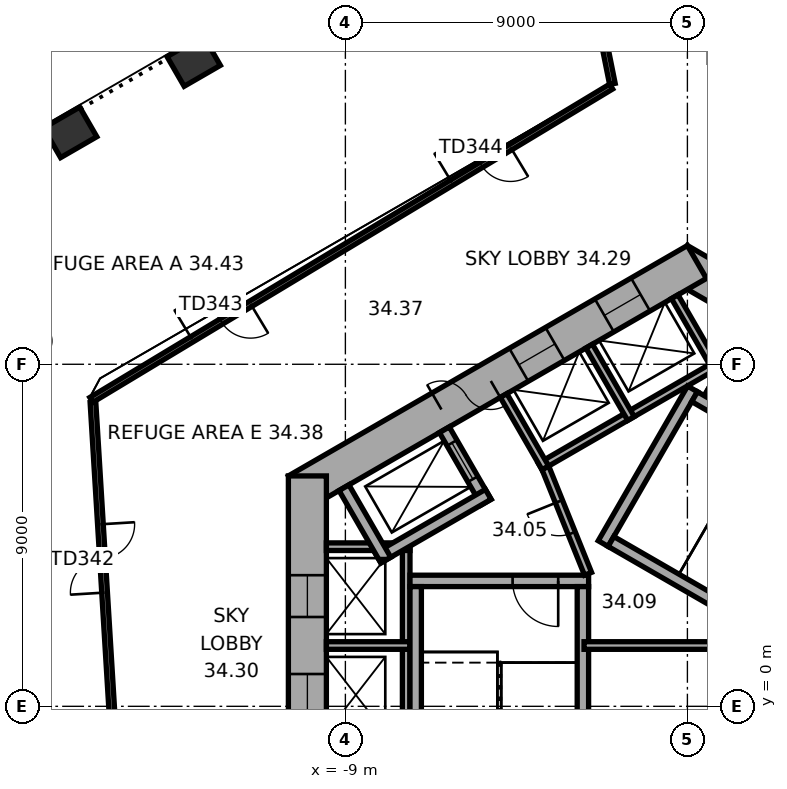
"""IFC4 building model, lengths in metres.
Left out: names, types, materials, properties, quantities, classifications, styles, units other than length and angle.
Written with IfcOpenShell. Run it as: python <this file> out.ifc"""

import sys

from ifc_helpers import new_model, si_unit, direction, frame, frame_2d, origin, origin_2d, place, context, subcontext, project, spatial, rectangle, extrude, element, fill, save


model = new_model("IFC4")
c1 = context("Model", 3, precision=1e-05, world=origin(), true_north=direction((0.0, 1.0)))
c2 = subcontext(c1, "Body", "Model", "MODEL_VIEW")
j1 = project(units=[si_unit("LENGTHUNIT", "METRE"), si_unit("PLANEANGLEUNIT", "RADIAN")], contexts=[c1])
p1 = place(None, origin())
s1 = spatial("IfcSite", under=j1, at=p1, CompositionType="ELEMENT")
p2 = place(p1, origin())
s2 = spatial("IfcBuilding", under=s1, at=p2, CompositionType="ELEMENT")
p3 = place(p2, frame((0.0, 0.0, 139.2)))
s3 = spatial("IfcBuildingStorey", under=s2, at=p3, CompositionType="ELEMENT", Elevation=139.2)
for number, where, z_axis, x_axis in (
    (1, (-12.991, 16.979, 0.0), (0.0, 0.0, 1.0), (-0.866, -0.5, 0.0)),
    (2, (-16.242, 15.102, 0.0), (0.0, 0.0, 1.0), (-0.866, -0.5, 0.0)),
):
    element("IfcColumn", number, at=place(p3, frame(where, z_axis=z_axis, x_axis=x_axis)), inside=s3, PredefinedType="COLUMN", context=c2, shape_type="SweptSolid", body=[
        extrude(rectangle(XDim=1.1, YDim=0.9, at=origin_2d()), origin(), (0.0, 0.0, 1.0), 7.4),
    ])
p4 = place(p3, frame((10.25, 5.629, 0.0), z_axis=(0.0, 0.0, 1.0), x_axis=(-0.866022616891, 0.50000482701, 0.0)))
e3 = element("IfcWall", 3, at=p4, inside=s3, PredefinedType="SHEAR", context=c2, shape_type="SweptSolid", body=[
    extrude(rectangle(XDim=12.125, YDim=1.0, at=frame_2d((6.062, 0.0))), origin(), (0.0, 0.0, 1.0), 7.4),
])
p5 = place(p4, frame((2.612, 0.0, 0.0)))
e4 = element("IfcOpeningElement", 4, at=p5, cuts=e3, PredefinedType="OPENING", context=c2, shape_type="SweptSolid", body=[
    extrude(rectangle(XDim=1.1, YDim=2.1, at=frame_2d((0.55, 1.05))), frame((0.0, 0.51, 0.0), z_axis=(0.0, -1.0, 0.0), x_axis=(1.0, 0.0, 0.0)), (0.0, 0.0, 1.0), 1.02),
])
p6 = place(p4, frame((5.212, 0.0, 0.0)))
e5 = element("IfcOpeningElement", 5, at=p6, cuts=e3, PredefinedType="OPENING", context=c2, shape_type="SweptSolid", body=[
    extrude(rectangle(XDim=1.1, YDim=2.1, at=frame_2d((0.55, 1.05))), frame((0.0, 0.51, 0.0), z_axis=(0.0, -1.0, 0.0), x_axis=(1.0, 0.0, 0.0)), (0.0, 0.0, 1.0), 1.02),
])
p7 = place(p4, frame((7.812, 0.0, 0.0)))
e6 = element("IfcOpeningElement", 6, at=p7, cuts=e3, PredefinedType="OPENING", context=c2, shape_type="SweptSolid", body=[
    extrude(rectangle(XDim=1.1, YDim=2.1, at=frame_2d((0.55, 1.05))), frame((0.0, 0.51, 0.0), z_axis=(0.0, -1.0, 0.0), x_axis=(1.0, 0.0, 0.0)), (0.0, 0.0, 1.0), 1.02),
])
p8 = place(p3, frame((0.25, 11.691, 0.0), z_axis=(0.0, 0.0, 1.0), x_axis=(-0.866022616891, -0.50000482701, 0.0)))
e7 = element("IfcWall", 7, at=p8, inside=s3, PredefinedType="SHEAR", context=c2, shape_type="SweptSolid", body=[
    extrude(rectangle(XDim=12.125, YDim=1.0, at=frame_2d((6.062, 0.0))), origin(), (0.0, 0.0, 1.0), 7.4),
])
p9 = place(p8, frame((6.262, 0.0, 0.0)))
e8 = element("IfcOpeningElement", 8, at=p9, cuts=e7, PredefinedType="OPENING", context=c2, shape_type="SweptSolid", body=[
    extrude(rectangle(XDim=1.5, YDim=2.1, at=frame_2d((0.75, 1.05))), frame((0.0, 0.51, 0.0), z_axis=(0.0, -1.0, 0.0), x_axis=(1.0, 0.0, 0.0)), (0.0, 0.0, 1.0), 1.02),
])
p10 = place(p8, frame((1.712, 0.0, 0.0)))
e9 = element("IfcOpeningElement", 9, at=p10, cuts=e7, PredefinedType="OPENING", context=c2, shape_type="SweptSolid", body=[
    extrude(rectangle(XDim=1.1, YDim=2.1, at=frame_2d((0.55, 1.05))), frame((0.0, 0.51, 0.0), z_axis=(0.0, -1.0, 0.0), x_axis=(1.0, 0.0, 0.0)), (0.0, 0.0, 1.0), 1.02),
])
p11 = place(p8, frame((4.312, 0.0, 0.0)))
e10 = element("IfcOpeningElement", 10, at=p11, cuts=e7, PredefinedType="OPENING", context=c2, shape_type="SweptSolid", body=[
    extrude(rectangle(XDim=1.1, YDim=2.1, at=frame_2d((0.55, 1.05))), frame((0.0, 0.51, 0.0), z_axis=(0.0, -1.0, 0.0), x_axis=(1.0, 0.0, 0.0)), (0.0, 0.0, 1.0), 1.02),
])
p12 = place(p3, frame((-10.0, 6.062, 0.0), z_axis=(0.0, 0.0, 1.0), x_axis=(0.0, -1.0, 0.0)))
e11 = element("IfcWall", 11, at=p12, inside=s3, PredefinedType="SHEAR", context=c2, shape_type="SweptSolid", body=[
    extrude(rectangle(XDim=12.125, YDim=1.0, at=frame_2d((6.062, 0.0))), origin(), (0.0, 0.0, 1.0), 7.4),
])
p13 = place(p12, frame((5.212, 0.0, 0.0)))
e12 = element("IfcOpeningElement", 12, at=p13, cuts=e11, PredefinedType="OPENING", context=c2, shape_type="SweptSolid", body=[
    extrude(rectangle(XDim=1.1, YDim=2.1, at=frame_2d((0.55, 1.05))), frame((0.0, 0.51, 0.0), z_axis=(0.0, -1.0, 0.0), x_axis=(1.0, 0.0, 0.0)), (0.0, 0.0, 1.0), 1.02),
])
p14 = place(p12, frame((7.812, 0.0, 0.0)))
e13 = element("IfcOpeningElement", 13, at=p14, cuts=e11, PredefinedType="OPENING", context=c2, shape_type="SweptSolid", body=[
    extrude(rectangle(XDim=1.1, YDim=2.1, at=frame_2d((0.55, 1.05))), frame((0.0, 0.51, 0.0), z_axis=(0.0, -1.0, 0.0), x_axis=(1.0, 0.0, 0.0)), (0.0, 0.0, 1.0), 1.02),
])
p15 = place(p12, frame((2.612, 0.0, 0.0)))
e14 = element("IfcOpeningElement", 14, at=p15, cuts=e11, PredefinedType="OPENING", context=c2, shape_type="SweptSolid", body=[
    extrude(rectangle(XDim=1.1, YDim=2.1, at=frame_2d((0.55, 1.05))), frame((0.0, 0.51, 0.0), z_axis=(0.0, -1.0, 0.0), x_axis=(1.0, 0.0, 0.0)), (0.0, 0.0, 1.0), 1.02),
])
p16 = place(p3, frame((-14.638, -8.425, 0.0), z_axis=(0.0, 0.0, 1.0), x_axis=(-0.06105243285, 0.998134560289, 0.0)))
e15 = element("IfcWall", 15, at=p16, inside=s3, PredefinedType="STANDARD", context=c2, shape_type="SweptSolid", body=[
    extrude(rectangle(XDim=16.451, YDim=0.15, at=frame_2d((8.226, 0.0))), origin(), (0.0, 0.0, 1.0), 2.6),
])
p17 = place(p16, frame((3.213, 0.0, 0.0)))
e16 = element("IfcOpeningElement", 16, at=p17, cuts=e15, PredefinedType="OPENING", context=c2, shape_type="SweptSolid", body=[
    extrude(rectangle(XDim=1.8, YDim=2.4, at=frame_2d((0.9, 1.2))), frame((0.0, 0.085, 0.0), z_axis=(0.0, -1.0, 0.0), x_axis=(1.0, 0.0, 0.0)), (0.0, 0.0, 1.0), 0.17),
])
p18 = place(p16, frame((11.438, 0.0, 0.0)))
e17 = element("IfcOpeningElement", 17, at=p18, cuts=e15, PredefinedType="OPENING", context=c2, shape_type="SweptSolid", body=[
    extrude(rectangle(XDim=1.8, YDim=2.4, at=frame_2d((0.9, 1.2))), frame((0.0, 0.085, 0.0), z_axis=(0.0, -1.0, 0.0), x_axis=(1.0, 0.0, 0.0)), (0.0, 0.0, 1.0), 0.17),
])
p19 = place(p3, frame((-15.687, 8.062, 0.0), z_axis=(0.0, 0.0, 1.0), x_axis=(0.856487923842, 0.516167062406, 0.0)))
e18 = element("IfcWall", 18, at=p19, inside=s3, PredefinedType="STANDARD", context=c2, shape_type="SweptSolid", body=[
    extrude(rectangle(XDim=15.973, YDim=0.15, at=frame_2d((7.987, 0.0))), origin(), (0.0, 0.0, 1.0), 2.6),
])
p20 = place(p19, frame((3.093, 0.0, 0.0)))
e19 = element("IfcOpeningElement", 19, at=p20, cuts=e18, PredefinedType="OPENING", context=c2, shape_type="SweptSolid", body=[
    extrude(rectangle(XDim=1.8, YDim=2.4, at=frame_2d((0.9, 1.2))), frame((0.0, 0.085, 0.0), z_axis=(0.0, -1.0, 0.0), x_axis=(1.0, 0.0, 0.0)), (0.0, 0.0, 1.0), 0.17),
])
p21 = place(p19, frame((11.08, 0.0, 0.0)))
e20 = element("IfcOpeningElement", 20, at=p21, cuts=e18, PredefinedType="OPENING", context=c2, shape_type="SweptSolid", body=[
    extrude(rectangle(XDim=1.8, YDim=2.4, at=frame_2d((0.9, 1.2))), frame((0.0, 0.085, 0.0), z_axis=(0.0, -1.0, 0.0), x_axis=(1.0, 0.0, 0.0)), (0.0, 0.0, 1.0), 0.17),
])
p22 = place(p3, frame((-1.974, 16.378, 0.0), z_axis=(0.0, 0.0, 1.0), x_axis=(-0.196789745995, 0.980445712863, 0.0)))
e21 = element("IfcWall", 21, at=p22, inside=s3, PredefinedType="STANDARD", context=c2, shape_type="SweptSolid", body=[
    extrude(rectangle(XDim=5.506, YDim=0.15, at=frame_2d((2.753, 0.0))), origin(), (0.0, 0.0, 1.0), 2.6),
])
p23 = place(p3, frame((7.424, 4.259, 0.0), z_axis=(0.0, 0.0, 1.0), x_axis=(-0.866026010844, 0.49999894854, 0.0)))
e22 = element("IfcWall", 22, at=p23, inside=s3, PredefinedType="PARTITIONING", context=c2, shape_type="SweptSolid", body=[
    extrude(rectangle(XDim=8.0, YDim=0.2, at=frame_2d((4.0, 0.0))), origin(), (0.0, 0.0, 1.0), 7.12),
])
p24 = place(p3, frame((0.532, 8.122, 0.0), z_axis=(0.0, 0.0, 1.0), x_axis=(0.500077893725, 0.86598042715, 0.0)))
e23 = element("IfcWall", 23, at=p24, inside=s3, PredefinedType="PARTITIONING", context=c2, shape_type="SweptSolid", body=[
    extrude(rectangle(XDim=2.2, YDim=0.2, at=frame_2d((1.1, 0.0))), origin(), (0.0, 0.0, 1.0), 7.12),
])
p25 = place(p3, frame((0.803, 9.009, 0.0), z_axis=(0.0, 0.0, 1.0), x_axis=(-0.866028230842, -0.499995103361, 0.0)))
e24 = element("IfcWall", 24, at=p25, inside=s3, PredefinedType="PARTITIONING", context=c2, shape_type="SweptSolid", body=[
    extrude(rectangle(XDim=5.4, YDim=0.2, at=frame_2d((2.7, 0.0))), origin(), (0.0, 0.0, 1.0), 7.12),
])
p26 = place(p3, frame((0.767, 8.872, 0.0), z_axis=(0.0, 0.0, 1.0), x_axis=(-0.499994660107, 0.866028486751, 0.0)))
e25 = element("IfcWall", 25, at=p26, inside=s3, PredefinedType="PARTITIONING", context=c2, shape_type="SweptSolid", body=[
    extrude(rectangle(XDim=2.2, YDim=0.2, at=frame_2d((1.1, 0.0))), origin(), (0.0, 0.0, 1.0), 7.12),
])
for number, where, z_axis, x_axis in (
    (26, (-1.485, 7.572, 0.0), (0.0, 0.0, 1.0), (-0.5, 0.866, 0.0)),
    (27, (-3.737, 6.272, 0.0), (0.0, 0.0, 1.0), (-0.5, 0.866, 0.0)),
):
    element("IfcWall", number, at=place(p3, frame(where, z_axis=z_axis, x_axis=x_axis)), inside=s3, PredefinedType="PARTITIONING", context=c2, shape_type="SweptSolid", body=[
        extrude(rectangle(XDim=2.2, YDim=0.2, at=frame_2d((1.1, 0.0))), origin(), (0.0, 0.0, 1.0), 7.12),
    ])
p27 = place(p3, frame((-7.4, 4.3, 0.0), z_axis=(0.0, 0.0, 1.0), x_axis=(0.0, -1.0, 0.0)))
e28 = element("IfcWall", 28, at=p27, inside=s3, PredefinedType="PARTITIONING", context=c2, shape_type="SweptSolid", body=[
    extrude(rectangle(XDim=8.0, YDim=0.2, at=frame_2d((4.0, 0.0))), origin(), (0.0, 0.0, 1.0), 7.12),
])
for number, where, z_axis, x_axis in (
    (29, (-7.3, 4.2, 0.0), (0.0, 0.0, 1.0), (-1.0, 0.0, 0.0)),
    (30, (-7.3, 1.6, 0.0), (0.0, 0.0, 1.0), (-1.0, 0.0, 0.0)),
):
    element("IfcWall", number, at=place(p3, frame(where, z_axis=z_axis, x_axis=x_axis)), inside=s3, PredefinedType="PARTITIONING", context=c2, shape_type="SweptSolid", body=[
        extrude(rectangle(XDim=2.2, YDim=0.2, at=frame_2d((1.1, 0.0))), origin(), (0.0, 0.0, 1.0), 7.12),
    ])
p28 = place(p3, frame((-2.216, 4.282, 0.0), z_axis=(0.0, 0.0, 1.0), x_axis=(0.499977259774, 0.866038532462, 0.0)))
e31 = element("IfcWall", 31, at=p28, inside=s3, PredefinedType="SHEAR", context=c2, shape_type="SweptSolid", body=[
    extrude(rectangle(XDim=4.7, YDim=0.3, at=frame_2d((2.35, 0.0))), origin(), (0.0, 0.0, 1.0), 7.12),
])
for number, where, z_axis, x_axis in (
    (32, (4.103, 0.807, 0.0), (0.0, 0.0, 1.0), (-0.866, 0.5, 0.0)),
    (33, (6.303, 4.617, 0.0), (0.0, 0.0, 1.0), (-0.866, 0.5, 0.0)),
):
    element("IfcWall", number, at=place(p3, frame(where, z_axis=z_axis, x_axis=x_axis)), inside=s3, PredefinedType="SHEAR", context=c2, shape_type="SweptSolid", body=[
        extrude(rectangle(XDim=7.06, YDim=0.3, at=frame_2d((3.53, 0.0))), origin(), (0.0, 0.0, 1.0), 7.12),
    ])
p29 = place(p3, frame((-2.6, 3.3, 0.0), z_axis=(0.0, 0.0, 1.0), x_axis=(-1.0, 0.0, 0.0)))
e34 = element("IfcWall", 34, at=p29, inside=s3, PredefinedType="SHEAR", context=c2, shape_type="SweptSolid", body=[
    extrude(rectangle(XDim=4.7, YDim=0.3, at=frame_2d((2.35, 0.0))), origin(), (0.0, 0.0, 1.0), 7.12),
])
p30 = place(p29, frame((0.8, 0.0, 0.0)))
e35 = element("IfcOpeningElement", 35, at=p30, cuts=e34, PredefinedType="OPENING", context=c2, shape_type="SweptSolid", body=[
    extrude(rectangle(XDim=1.2, YDim=2.1, at=frame_2d((0.6, 1.05))), frame((0.0, 0.16, 0.0), z_axis=(0.0, -1.0, 0.0), x_axis=(1.0, 0.0, 0.0)), (0.0, 0.0, 1.0), 0.32),
])
for number, where, z_axis, x_axis in (
    (36, (-2.75, 3.15, 0.0), (0.0, 0.0, 1.0), (0.0, -1.0, 0.0)),
    (37, (-7.15, 3.15, 0.0), (0.0, 0.0, 1.0), (0.0, -1.0, 0.0)),
):
    element("IfcWall", number, at=place(p3, frame(where, z_axis=z_axis, x_axis=x_axis)), inside=s3, PredefinedType="SHEAR", context=c2, shape_type="SweptSolid", body=[
        extrude(rectangle(XDim=7.06, YDim=0.3, at=frame_2d((3.53, 0.0))), origin(), (0.0, 0.0, 1.0), 7.12),
    ])
p31 = place(p3, frame((-5.295, 5.372, 0.0), z_axis=(0.0, 0.0, 1.0), x_axis=(-0.500077893725, 0.86598042715, 0.0)))
e38 = element("IfcWall", 38, at=p31, inside=s3, PredefinedType="SHEAR", context=c2, shape_type="SweptSolid", body=[
    extrude(rectangle(XDim=2.2, YDim=0.3, at=frame_2d((1.1, 0.0))), origin(), (0.0, 0.0, 1.0), 7.12),
])
p32 = place(p31, frame((0.7, 0.0, 0.0)))
e39 = element("IfcOpeningElement", 39, at=p32, cuts=e38, PredefinedType="OPENING", context=c2, shape_type="SweptSolid", body=[
    extrude(rectangle(XDim=1.1, YDim=2.1, at=frame_2d((0.55, 1.05))), frame((0.0, 0.16, 0.0), z_axis=(0.0, -1.0, 0.0), x_axis=(1.0, 0.0, 0.0)), (0.0, 0.0, 1.0), 0.32),
])
p33 = place(p3, frame((-5.24, 5.577, 0.0), z_axis=(0.0, 0.0, 1.0), x_axis=(-0.866014461049, -0.500018952895, 0.0)))
e40 = element("IfcWall", 40, at=p33, inside=s3, PredefinedType="SHEAR", context=c2, shape_type="SweptSolid", body=[
    extrude(rectangle(XDim=3.35, YDim=0.3, at=frame_2d((1.675, 0.0))), origin(), (0.0, 0.0, 1.0), 7.12),
])
p34 = place(p3, frame((-7.937, 3.847, 0.0), z_axis=(0.0, 0.0, 1.0), x_axis=(-0.50002983664, 0.866008176907, 0.0)))
e41 = element("IfcWall", 41, at=p34, inside=s3, PredefinedType="SHEAR", context=c2, shape_type="SweptSolid", body=[
    extrude(rectangle(XDim=2.2, YDim=0.3, at=frame_2d((1.1, 0.0))), origin(), (0.0, 0.0, 1.0), 7.12),
])
p35 = place(p3, frame((-2.615, 3.487, 0.0), z_axis=(0.0, 0.0, 1.0), x_axis=(-0.373576831041, 0.92759924068, 0.0)))
e42 = element("IfcWall", 42, at=p35, inside=s3, PredefinedType="PARTITIONING", context=c2, shape_type="SweptSolid", body=[
    extrude(rectangle(XDim=3.002, YDim=0.2, at=frame_2d((1.501, 0.0))), origin(), (0.0, 0.0, 1.0), 7.12),
])
p36 = place(p35, frame((1.15, 0.0, 0.0)))
e43 = element("IfcOpeningElement", 43, at=p36, cuts=e42, PredefinedType="OPENING", context=c2, shape_type="SweptSolid", body=[
    extrude(rectangle(XDim=0.9, YDim=2.1, at=frame_2d((0.45, 1.05))), frame((0.0, 0.11, 0.0), z_axis=(0.0, -1.0, 0.0), x_axis=(1.0, 0.0, 0.0)), (0.0, 0.0, 1.0), 0.22),
])
p37 = place(p3, frame((-2.72, 1.6, 0.0), z_axis=(0.0, 0.0, 1.0), x_axis=(1.0, 0.0, 0.0)))
e44 = element("IfcWall", 44, at=p37, inside=s3, PredefinedType="PARTITIONING", context=c2, shape_type="SweptSolid", body=[
    extrude(rectangle(XDim=5.269, YDim=0.2, at=frame_2d((2.634, 0.0))), origin(), (0.0, 0.0, 1.0), 7.12),
])
p38 = place(p18, origin())
e45 = element("IfcDoor", 45, at=p38, inside=s3, OperationType="DOUBLE_DOOR_DOUBLE_SWING", PredefinedType="DOOR", context=c2, shape_type="SweptSolid", body=[
    extrude(rectangle(XDim=1.8, YDim=2.4, at=frame_2d((0.9, 1.2))), frame((0.0, 0.025, 0.0), z_axis=(0.0, -1.0, 0.0), x_axis=(1.0, 0.0, 0.0)), (0.0, 0.0, 1.0), 0.05),
])
fill(e17, e45)
p39 = place(p20, origin())
e46 = element("IfcDoor", 46, at=p39, inside=s3, OperationType="DOUBLE_DOOR_DOUBLE_SWING", PredefinedType="DOOR", context=c2, shape_type="SweptSolid", body=[
    extrude(rectangle(XDim=1.8, YDim=2.4, at=frame_2d((0.9, 1.2))), frame((0.0, 0.025, 0.0), z_axis=(0.0, -1.0, 0.0), x_axis=(1.0, 0.0, 0.0)), (0.0, 0.0, 1.0), 0.05),
])
fill(e19, e46)
p40 = place(p21, origin())
e47 = element("IfcDoor", 47, at=p40, inside=s3, OperationType="DOUBLE_DOOR_DOUBLE_SWING", PredefinedType="DOOR", context=c2, shape_type="SweptSolid", body=[
    extrude(rectangle(XDim=1.8, YDim=2.4, at=frame_2d((0.9, 1.2))), frame((0.0, 0.025, 0.0), z_axis=(0.0, -1.0, 0.0), x_axis=(1.0, 0.0, 0.0)), (0.0, 0.0, 1.0), 0.05),
])
fill(e20, e47)
p41 = place(p9, origin())
e48 = element("IfcDoor", 48, at=p41, inside=s3, OperationType="DOUBLE_DOOR_SINGLE_SWING", PredefinedType="DOOR", context=c2, shape_type="SweptSolid", body=[
    extrude(rectangle(XDim=1.5, YDim=2.1, at=frame_2d((0.75, 1.05))), frame((0.0, 0.025, 0.0), z_axis=(0.0, -1.0, 0.0), x_axis=(1.0, 0.0, 0.0)), (0.0, 0.0, 1.0), 0.05),
])
fill(e8, e48)
p42 = place(p30, origin())
e49 = element("IfcDoor", 49, at=p42, inside=s3, OperationType="SINGLE_SWING_RIGHT", PredefinedType="DOOR", context=c2, shape_type="SweptSolid", body=[
    extrude(rectangle(XDim=1.2, YDim=2.1, at=frame_2d((0.6, 1.05))), frame((0.0, 0.025, 0.0), z_axis=(0.0, -1.0, 0.0), x_axis=(1.0, 0.0, 0.0)), (0.0, 0.0, 1.0), 0.05),
])
fill(e35, e49)
p43 = place(p36, origin())
e50 = element("IfcDoor", 50, at=p43, inside=s3, OperationType="SINGLE_SWING_LEFT", PredefinedType="DOOR", context=c2, shape_type="SweptSolid", body=[
    extrude(rectangle(XDim=0.9, YDim=2.1, at=frame_2d((0.45, 1.05))), frame((0.0, 0.025, 0.0), z_axis=(0.0, -1.0, 0.0), x_axis=(1.0, 0.0, 0.0)), (0.0, 0.0, 1.0), 0.05),
])
fill(e43, e50)
p44 = place(p32, origin())
e51 = element("IfcDoor", 51, at=p44, inside=s3, OperationType="DOUBLE_DOOR_SLIDING", PredefinedType="DOOR", context=c2, shape_type="SweptSolid", body=[
    extrude(rectangle(XDim=1.1, YDim=2.1, at=frame_2d((0.55, 1.05))), frame((0.0, 0.025, 0.0), z_axis=(0.0, -1.0, 0.0), x_axis=(1.0, 0.0, 0.0)), (0.0, 0.0, 1.0), 0.05),
])
fill(e39, e51)
p45 = place(p13, origin())
e52 = element("IfcDoor", 52, at=p45, inside=s3, OperationType="DOUBLE_DOOR_SLIDING", PredefinedType="DOOR", context=c2, shape_type="SweptSolid", body=[
    extrude(rectangle(XDim=1.1, YDim=2.1, at=frame_2d((0.55, 1.05))), frame((0.0, 0.025, 0.0), z_axis=(0.0, -1.0, 0.0), x_axis=(1.0, 0.0, 0.0)), (0.0, 0.0, 1.0), 0.05),
])
fill(e12, e52)
p46 = place(p10, origin())
e53 = element("IfcDoor", 53, at=p46, inside=s3, OperationType="DOUBLE_DOOR_SLIDING", PredefinedType="DOOR", context=c2, shape_type="SweptSolid", body=[
    extrude(rectangle(XDim=1.1, YDim=2.1, at=frame_2d((0.55, 1.05))), frame((0.0, 0.025, 0.0), z_axis=(0.0, -1.0, 0.0), x_axis=(1.0, 0.0, 0.0)), (0.0, 0.0, 1.0), 0.05),
])
fill(e9, e53)
p47 = place(p11, origin())
e54 = element("IfcDoor", 54, at=p47, inside=s3, OperationType="DOUBLE_DOOR_SLIDING", PredefinedType="DOOR", context=c2, shape_type="SweptSolid", body=[
    extrude(rectangle(XDim=1.1, YDim=2.1, at=frame_2d((0.55, 1.05))), frame((0.0, 0.025, 0.0), z_axis=(0.0, -1.0, 0.0), x_axis=(1.0, 0.0, 0.0)), (0.0, 0.0, 1.0), 0.05),
])
fill(e10, e54)
p48 = place(p15, origin())
e55 = element("IfcDoor", 55, at=p48, inside=s3, OperationType="DOUBLE_DOOR_SLIDING", PredefinedType="DOOR", context=c2, shape_type="SweptSolid", body=[
    extrude(rectangle(XDim=1.1, YDim=2.1, at=frame_2d((0.55, 1.05))), frame((0.0, 0.025, 0.0), z_axis=(0.0, -1.0, 0.0), x_axis=(1.0, 0.0, 0.0)), (0.0, 0.0, 1.0), 0.05),
])
fill(e14, e55)
save(model, sys.argv[1])
